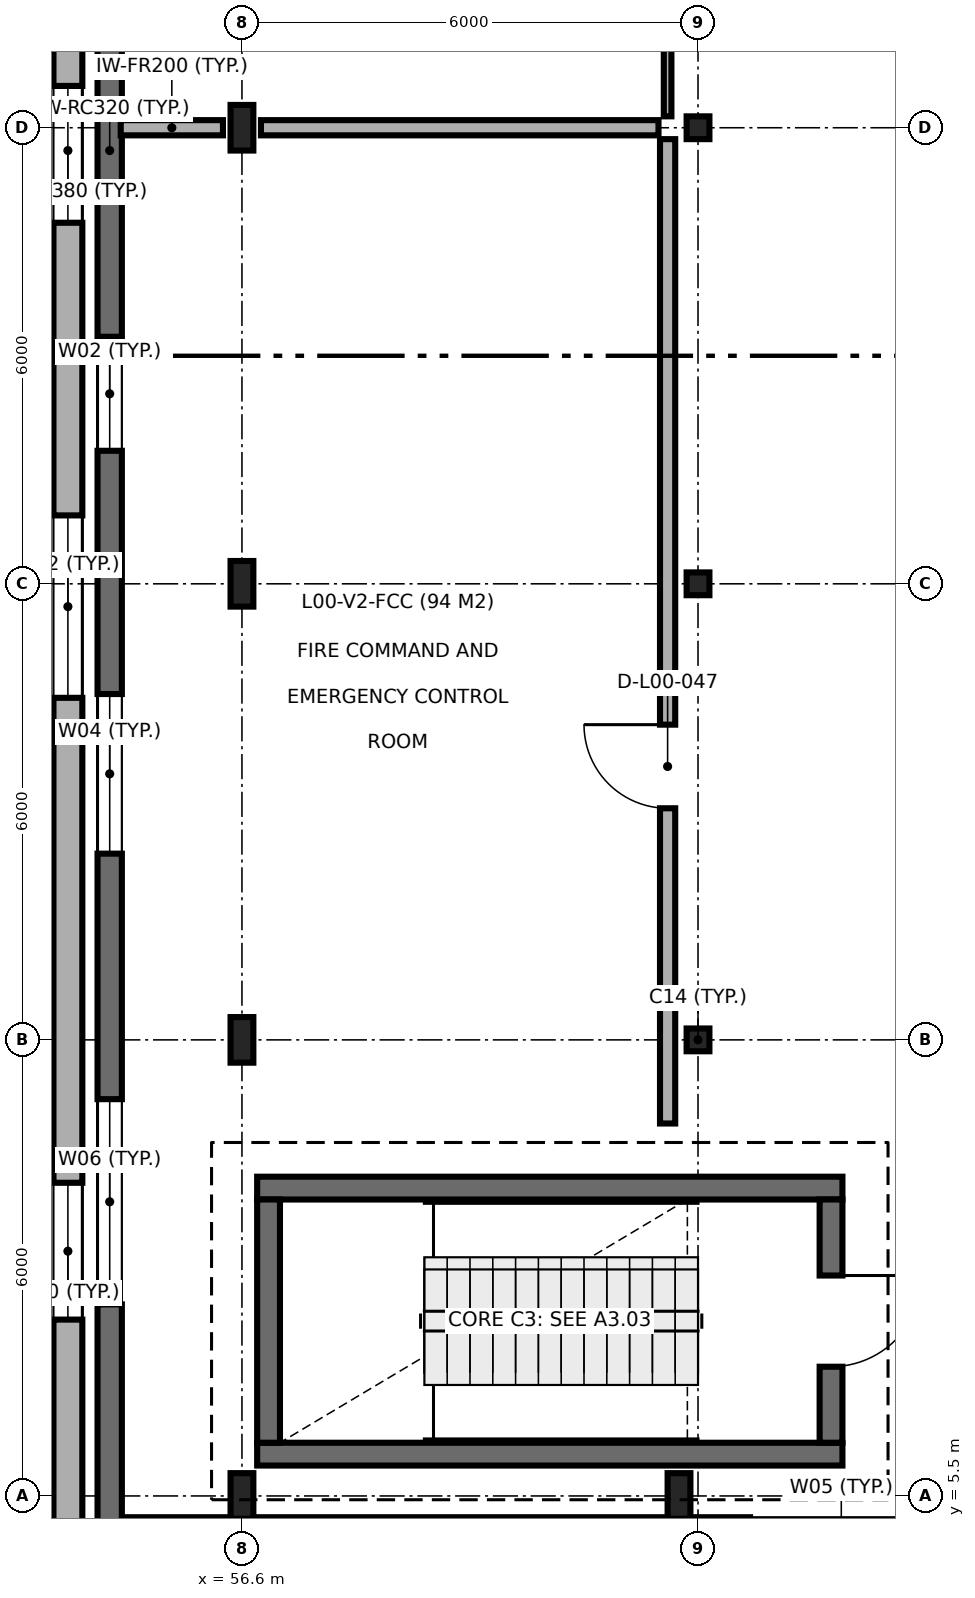
"""IFC4 building model, lengths in metres.
Left out: names, types, materials, properties, quantities, classifications, styles, units other than length and angle.
Written with IfcOpenShell. Run it as: python <this file> out.ifc"""

import sys

from ifc_helpers import new_model, si_unit, direction, frame, frame_2d, origin, origin_2d, place, context, subcontext, project, spatial, rectangle, hollow_rectangle, i_section, extrude, element, fill, save


model = new_model("IFC4")
c1 = context("Model", 3, precision=1e-05, world=origin(), true_north=direction((0.0, 1.0)))
c2 = subcontext(c1, "Body", "Model", "MODEL_VIEW")
j1 = project(units=[si_unit("LENGTHUNIT", "METRE"), si_unit("PLANEANGLEUNIT", "RADIAN")], contexts=[c1])
p1 = place(None, origin())
s1 = spatial("IfcSite", under=j1, at=p1, CompositionType="ELEMENT")
p2 = place(p1, origin())
s2 = spatial("IfcBuilding", under=s1, at=p2, CompositionType="ELEMENT")
p3 = place(p2, origin())
s3 = spatial("IfcBuildingStorey", under=s2, at=p3, CompositionType="ELEMENT", Elevation=0.0)
for number, where, z_axis, x_axis in (
    (1, (56.6, 5.5, 0.0), (0.0, 0.0, 1.0), (1.0, 0.0, 0.0)),
    (2, (56.6, 11.5, 0.0), (0.0, 0.0, 1.0), (1.0, 0.0, 0.0)),
    (3, (56.6, 17.5, 0.0), (0.0, 0.0, 1.0), (1.0, 0.0, 0.0)),
    (4, (56.6, 23.5, 0.0), (0.0, 0.0, 1.0), (1.0, 0.0, 0.0)),
    (5, (62.35, 5.5, 0.0), (0.0, 0.0, 1.0), (1.0, 0.0, 0.0)),
):
    element("IfcColumn", number, at=place(p3, frame(where, z_axis=z_axis, x_axis=x_axis)), inside=s3, PredefinedType="COLUMN", context=c2, shape_type="SweptSolid", body=[
        extrude(i_section(OverallWidth=0.3, OverallDepth=0.6, WebThickness=0.015, FlangeThickness=0.03, FilletRadius=0.027, at=origin_2d()), origin(), (0.0, 0.0, 1.0), 4.8),
    ])
for number, where, z_axis, x_axis in (
    (6, (62.6, 11.5, 0.0), (0.0, 0.0, 1.0), (1.0, 0.0, 0.0)),
    (7, (62.6, 17.5, 0.0), (0.0, 0.0, 1.0), (1.0, 0.0, 0.0)),
    (8, (62.6, 23.5, 0.0), (0.0, 0.0, 1.0), (1.0, 0.0, 0.0)),
):
    element("IfcColumn", number, at=place(p3, frame(where, z_axis=z_axis, x_axis=x_axis)), inside=s3, PredefinedType="COLUMN", context=c2, shape_type="SweptSolid", body=[
        extrude(hollow_rectangle(XDim=0.3, YDim=0.3, WallThickness=0.012, InnerFilletRadius=0.019, OuterFilletRadius=0.031, at=origin_2d()), origin(), (0.0, 0.0, 1.0), 4.8),
    ])
for number, where, z_axis, x_axis in (
    (9, (56.8, 6.05, 0.0), (0.0, 0.0, 1.0), (1.0, 0.0, 0.0)),
    (10, (64.5, 9.55, 0.0), (0.0, 0.0, 1.0), (-1.0, 0.0, 0.0)),
):
    element("IfcWall", number, at=place(p3, frame(where, z_axis=z_axis, x_axis=x_axis)), inside=s3, PredefinedType="SHEAR", context=c2, shape_type="SweptSolid", body=[
        extrude(rectangle(XDim=7.7, YDim=0.3, at=frame_2d((3.85, 0.0))), origin(), (0.0, 0.0, 1.0), 4.8),
    ])
p4 = place(p3, frame((56.95, 9.4, 0.0), z_axis=(0.0, 0.0, 1.0), x_axis=(0.0, -1.0, 0.0)))
e11 = element("IfcWall", 11, at=p4, inside=s3, PredefinedType="SHEAR", context=c2, shape_type="SweptSolid", body=[
    extrude(rectangle(XDim=3.2, YDim=0.3, at=frame_2d((1.6, 0.0))), origin(), (0.0, 0.0, 1.0), 4.8),
])
p5 = place(p3, frame((64.35, 6.2, 0.0), z_axis=(0.0, 0.0, 1.0), x_axis=(0.0, 1.0, 0.0)))
e12 = element("IfcWall", 12, at=p5, inside=s3, PredefinedType="SHEAR", context=c2, shape_type="SweptSolid", body=[
    extrude(rectangle(XDim=3.2, YDim=0.3, at=frame_2d((1.6, 0.0))), origin(), (0.0, 0.0, 1.0), 4.8),
])
p6 = place(p5, frame((1.0, 0.0, 0.0)))
e13 = element("IfcOpeningElement", 13, at=p6, cuts=e12, PredefinedType="OPENING", context=c2, shape_type="SweptSolid", body=[
    extrude(rectangle(XDim=1.2, YDim=2.15, at=frame_2d((0.6, 1.075))), frame((0.0, 0.16, 0.0), z_axis=(0.0, -1.0, 0.0), x_axis=(1.0, 0.0, 0.0)), (0.0, 0.0, 1.0), 0.32),
])
p7 = place(p3, frame((55.002, 5.06, 0.0), z_axis=(0.0, 0.0, 1.0), x_axis=(1.0, 0.0, 0.0)))
e14 = element("IfcWall", 14, at=p7, inside=s3, PredefinedType="SHEAR", context=c2, shape_type="SweptSolid", body=[
    extrude(rectangle(XDim=49.196, YDim=0.32, at=frame_2d((24.598, 0.0))), origin(), (0.0, 0.0, 1.0), 4.55),
])
p8 = place(p7, frame((19.998, 0.0, 0.0)))
e15 = element("IfcOpeningElement", 15, at=p8, cuts=e14, PredefinedType="OPENING", context=c2, shape_type="SweptSolid", body=[
    extrude(rectangle(XDim=2.0, YDim=2.4, at=frame_2d((1.0, 1.2))), frame((0.0, 0.17, 0.0), z_axis=(0.0, -1.0, 0.0), x_axis=(1.0, 0.0, 0.0)), (0.0, 0.0, 1.0), 0.34),
])
p9 = place(p7, frame((8.283, 0.0, 0.9)))
e16 = element("IfcOpeningElement", 16, at=p9, cuts=e14, PredefinedType="OPENING", context=c2, shape_type="SweptSolid", body=[
    extrude(rectangle(XDim=2.4, YDim=1.8, at=frame_2d((1.2, 0.9))), frame((0.0, 0.17, 0.0), z_axis=(0.0, -1.0, 0.0), x_axis=(1.0, 0.0, 0.0)), (0.0, 0.0, 1.0), 0.34),
])
p10 = place(p7, frame((13.898, 0.0, 0.9)))
e17 = element("IfcOpeningElement", 17, at=p10, cuts=e14, PredefinedType="OPENING", context=c2, shape_type="SweptSolid", body=[
    extrude(rectangle(XDim=0.9, YDim=1.8, at=frame_2d((0.45, 0.9))), frame((0.0, 0.17, 0.0), z_axis=(0.0, -1.0, 0.0), x_axis=(1.0, 0.0, 0.0)), (0.0, 0.0, 1.0), 0.34),
])
p11 = place(p7, frame((25.348, 0.0, 0.9)))
e18 = element("IfcOpeningElement", 18, at=p11, cuts=e14, PredefinedType="OPENING", context=c2, shape_type="SweptSolid", body=[
    extrude(rectangle(XDim=1.5, YDim=2.1, at=frame_2d((0.75, 1.05))), frame((0.0, 0.17, 0.0), z_axis=(0.0, -1.0, 0.0), x_axis=(1.0, 0.0, 0.0)), (0.0, 0.0, 1.0), 0.34),
])
p12 = place(p7, frame((28.373, 0.0, 0.9)))
e19 = element("IfcOpeningElement", 19, at=p12, cuts=e14, PredefinedType="OPENING", context=c2, shape_type="SweptSolid", body=[
    extrude(rectangle(XDim=1.2, YDim=1.8, at=frame_2d((0.6, 0.9))), frame((0.0, 0.17, 0.0), z_axis=(0.0, -1.0, 0.0), x_axis=(1.0, 0.0, 0.0)), (0.0, 0.0, 1.0), 0.34),
])
p13 = place(p7, frame((32.518, 0.0, 0.9)))
e20 = element("IfcOpeningElement", 20, at=p13, cuts=e14, PredefinedType="OPENING", context=c2, shape_type="SweptSolid", body=[
    extrude(rectangle(XDim=1.8, YDim=2.1, at=frame_2d((0.9, 1.05))), frame((0.0, 0.17, 0.0), z_axis=(0.0, -1.0, 0.0), x_axis=(1.0, 0.0, 0.0)), (0.0, 0.0, 1.0), 0.34),
])
p14 = place(p7, frame((37.248, 0.0, 0.9)))
e21 = element("IfcOpeningElement", 21, at=p14, cuts=e14, PredefinedType="OPENING", context=c2, shape_type="SweptSolid", body=[
    extrude(rectangle(XDim=1.2, YDim=1.5, at=frame_2d((0.6, 0.75))), frame((0.0, 0.17, 0.0), z_axis=(0.0, -1.0, 0.0), x_axis=(1.0, 0.0, 0.0)), (0.0, 0.0, 1.0), 0.34),
])
p15 = place(p7, frame((40.268, 0.0, 0.9)))
e22 = element("IfcOpeningElement", 22, at=p15, cuts=e14, PredefinedType="OPENING", context=c2, shape_type="SweptSolid", body=[
    extrude(rectangle(XDim=0.9, YDim=1.8, at=frame_2d((0.45, 0.9))), frame((0.0, 0.17, 0.0), z_axis=(0.0, -1.0, 0.0), x_axis=(1.0, 0.0, 0.0)), (0.0, 0.0, 1.0), 0.34),
])
p16 = place(p7, frame((44.123, 0.0, 0.9)))
e23 = element("IfcOpeningElement", 23, at=p16, cuts=e14, PredefinedType="OPENING", context=c2, shape_type="SweptSolid", body=[
    extrude(rectangle(XDim=1.2, YDim=2.4, at=frame_2d((0.6, 1.2))), frame((0.0, 0.17, 0.0), z_axis=(0.0, -1.0, 0.0), x_axis=(1.0, 0.0, 0.0)), (0.0, 0.0, 1.0), 0.34),
])
p17 = place(p3, frame((54.86, 41.5, 0.0), z_axis=(0.0, 0.0, 1.0), x_axis=(0.0, -1.0, 0.0)))
e24 = element("IfcWall", 24, at=p17, inside=s3, PredefinedType="SHEAR", context=c2, shape_type="SweptSolid", body=[
    extrude(rectangle(XDim=36.6, YDim=0.32, at=frame_2d((18.3, 0.0))), origin(), (0.0, 0.0, 1.0), 4.55),
])
p18 = place(p17, frame((1.39, 0.0, 0.9)))
e25 = element("IfcOpeningElement", 25, at=p18, cuts=e24, PredefinedType="OPENING", context=c2, shape_type="SweptSolid", body=[
    extrude(rectangle(XDim=2.55, YDim=1.95, at=frame_2d((1.275, 0.975))), frame((0.0, 0.17, 0.0), z_axis=(0.0, -1.0, 0.0), x_axis=(1.0, 0.0, 0.0)), (0.0, 0.0, 1.0), 0.34),
])
p19 = place(p17, frame((6.135, 0.0, 0.9)))
e26 = element("IfcOpeningElement", 26, at=p19, cuts=e24, PredefinedType="OPENING", context=c2, shape_type="SweptSolid", body=[
    extrude(rectangle(XDim=1.4, YDim=1.65, at=frame_2d((0.7, 0.825))), frame((0.0, 0.17, 0.0), z_axis=(0.0, -1.0, 0.0), x_axis=(1.0, 0.0, 0.0)), (0.0, 0.0, 1.0), 0.34),
])
p20 = place(p17, frame((10.405, 0.0, 0.9)))
e27 = element("IfcOpeningElement", 27, at=p20, cuts=e24, PredefinedType="OPENING", context=c2, shape_type="SweptSolid", body=[
    extrude(rectangle(XDim=1.2, YDim=1.8, at=frame_2d((0.6, 0.9))), frame((0.0, 0.17, 0.0), z_axis=(0.0, -1.0, 0.0), x_axis=(1.0, 0.0, 0.0)), (0.0, 0.0, 1.0), 0.34),
])
p21 = place(p17, frame((14.275, 0.0, 0.9)))
e28 = element("IfcOpeningElement", 28, at=p21, cuts=e24, PredefinedType="OPENING", context=c2, shape_type="SweptSolid", body=[
    extrude(rectangle(XDim=1.8, YDim=1.8, at=frame_2d((0.9, 0.9))), frame((0.0, 0.17, 0.0), z_axis=(0.0, -1.0, 0.0), x_axis=(1.0, 0.0, 0.0)), (0.0, 0.0, 1.0), 0.34),
])
p22 = place(p17, frame((20.75, 0.0, 0.9)))
e29 = element("IfcOpeningElement", 29, at=p22, cuts=e24, PredefinedType="OPENING", context=c2, shape_type="SweptSolid", body=[
    extrude(rectangle(XDim=1.5, YDim=1.8, at=frame_2d((0.75, 0.9))), frame((0.0, 0.17, 0.0), z_axis=(0.0, -1.0, 0.0), x_axis=(1.0, 0.0, 0.0)), (0.0, 0.0, 1.0), 0.34),
])
p23 = place(p17, frame((25.45, 0.0, 0.9)))
e30 = element("IfcOpeningElement", 30, at=p23, cuts=e24, PredefinedType="OPENING", context=c2, shape_type="SweptSolid", body=[
    extrude(rectangle(XDim=2.1, YDim=1.8, at=frame_2d((1.05, 0.9))), frame((0.0, 0.17, 0.0), z_axis=(0.0, -1.0, 0.0), x_axis=(1.0, 0.0, 0.0)), (0.0, 0.0, 1.0), 0.34),
])
p24 = place(p17, frame((30.78, 0.0, 0.9)))
e31 = element("IfcOpeningElement", 31, at=p24, cuts=e24, PredefinedType="OPENING", context=c2, shape_type="SweptSolid", body=[
    extrude(rectangle(XDim=2.7, YDim=1.8, at=frame_2d((1.35, 0.9))), frame((0.0, 0.17, 0.0), z_axis=(0.0, -1.0, 0.0), x_axis=(1.0, 0.0, 0.0)), (0.0, 0.0, 1.0), 0.34),
])
p25 = place(p3, frame((5.962, 5.09, 0.0), z_axis=(0.0, 0.0, 1.0), x_axis=(1.0, 0.0, 0.0)))
e32 = element("IfcWall", 32, at=p25, inside=s3, PredefinedType="SOLIDWALL", context=c2, shape_type="SweptSolid", body=[
    extrude(rectangle(XDim=48.176, YDim=0.38, at=frame_2d((24.088, 0.0))), origin(), (0.0, 0.0, 1.0), 4.55),
])
p26 = place(p25, frame((10.614, 0.0, 0.9)))
e33 = element("IfcOpeningElement", 33, at=p26, cuts=e32, PredefinedType="OPENING", context=c2, shape_type="SweptSolid", body=[
    extrude(rectangle(XDim=1.2, YDim=1.8, at=frame_2d((0.6, 0.9))), frame((0.0, 0.2, 0.0), z_axis=(0.0, -1.0, 0.0), x_axis=(1.0, 0.0, 0.0)), (0.0, 0.0, 1.0), 0.4),
])
p27 = place(p25, frame((13.458, 0.0, 0.9)))
e34 = element("IfcOpeningElement", 34, at=p27, cuts=e32, PredefinedType="OPENING", context=c2, shape_type="SweptSolid", body=[
    extrude(rectangle(XDim=1.2, YDim=1.8, at=frame_2d((0.6, 0.9))), frame((0.0, 0.2, 0.0), z_axis=(0.0, -1.0, 0.0), x_axis=(1.0, 0.0, 0.0)), (0.0, 0.0, 1.0), 0.4),
])
p28 = place(p25, frame((29.438, 0.0, 0.9)))
e35 = element("IfcOpeningElement", 35, at=p28, cuts=e32, PredefinedType="OPENING", context=c2, shape_type="SweptSolid", body=[
    extrude(rectangle(XDim=2.4, YDim=1.8, at=frame_2d((1.2, 0.9))), frame((0.0, 0.2, 0.0), z_axis=(0.0, -1.0, 0.0), x_axis=(1.0, 0.0, 0.0)), (0.0, 0.0, 1.0), 0.4),
])
p29 = place(p25, frame((33.738, 0.0, 0.9)))
e36 = element("IfcOpeningElement", 36, at=p29, cuts=e32, PredefinedType="OPENING", context=c2, shape_type="SweptSolid", body=[
    extrude(rectangle(XDim=1.8, YDim=2.1, at=frame_2d((0.9, 1.05))), frame((0.0, 0.2, 0.0), z_axis=(0.0, -1.0, 0.0), x_axis=(1.0, 0.0, 0.0)), (0.0, 0.0, 1.0), 0.4),
])
p30 = place(p25, frame((37.258, 0.0, 0.9)))
e37 = element("IfcOpeningElement", 37, at=p30, cuts=e32, PredefinedType="OPENING", context=c2, shape_type="SweptSolid", body=[
    extrude(rectangle(XDim=0.9, YDim=1.8, at=frame_2d((0.45, 0.9))), frame((0.0, 0.2, 0.0), z_axis=(0.0, -1.0, 0.0), x_axis=(1.0, 0.0, 0.0)), (0.0, 0.0, 1.0), 0.4),
])
p31 = place(p25, frame((39.018, 0.0, 0.9)))
e38 = element("IfcOpeningElement", 38, at=p31, cuts=e32, PredefinedType="OPENING", context=c2, shape_type="SweptSolid", body=[
    extrude(rectangle(XDim=0.9, YDim=1.8, at=frame_2d((0.45, 0.9))), frame((0.0, 0.2, 0.0), z_axis=(0.0, -1.0, 0.0), x_axis=(1.0, 0.0, 0.0)), (0.0, 0.0, 1.0), 0.4),
])
p32 = place(p25, frame((41.538, 0.0, 0.9)))
e39 = element("IfcOpeningElement", 39, at=p32, cuts=e32, PredefinedType="OPENING", context=c2, shape_type="SweptSolid", body=[
    extrude(rectangle(XDim=1.2, YDim=1.8, at=frame_2d((0.6, 0.9))), frame((0.0, 0.2, 0.0), z_axis=(0.0, -1.0, 0.0), x_axis=(1.0, 0.0, 0.0)), (0.0, 0.0, 1.0), 0.4),
])
p33 = place(p25, frame((44.538, 0.0, 0.9)))
e40 = element("IfcOpeningElement", 40, at=p33, cuts=e32, PredefinedType="OPENING", context=c2, shape_type="SweptSolid", body=[
    extrude(rectangle(XDim=1.2, YDim=1.5, at=frame_2d((0.6, 0.75))), frame((0.0, 0.2, 0.0), z_axis=(0.0, -1.0, 0.0), x_axis=(1.0, 0.0, 0.0)), (0.0, 0.0, 1.0), 0.4),
])
p34 = place(p3, frame((54.31, 4.9, 0.0), z_axis=(0.0, 0.0, 1.0), x_axis=(0.0, 1.0, 0.0)))
e41 = element("IfcWall", 41, at=p34, inside=s3, PredefinedType="SOLIDWALL", context=c2, shape_type="SweptSolid", body=[
    extrude(rectangle(XDim=36.6, YDim=0.38, at=frame_2d((18.3, 0.0))), origin(), (0.0, 0.0, 1.0), 4.55),
])
p35 = place(p34, frame((2.92, 0.0, 0.9)))
e42 = element("IfcOpeningElement", 42, at=p35, cuts=e41, PredefinedType="OPENING", context=c2, shape_type="SweptSolid", body=[
    extrude(rectangle(XDim=1.8, YDim=2.1, at=frame_2d((0.9, 1.05))), frame((0.0, 0.2, 0.0), z_axis=(0.0, -1.0, 0.0), x_axis=(1.0, 0.0, 0.0)), (0.0, 0.0, 1.0), 0.4),
])
p36 = place(p34, frame((11.1, 0.0, 0.9)))
e43 = element("IfcOpeningElement", 43, at=p36, cuts=e41, PredefinedType="OPENING", context=c2, shape_type="SweptSolid", body=[
    extrude(rectangle(XDim=2.4, YDim=2.1, at=frame_2d((1.2, 1.05))), frame((0.0, 0.2, 0.0), z_axis=(0.0, -1.0, 0.0), x_axis=(1.0, 0.0, 0.0)), (0.0, 0.0, 1.0), 0.4),
])
p37 = place(p34, frame((17.35, 0.0, 0.9)))
e44 = element("IfcOpeningElement", 44, at=p37, cuts=e41, PredefinedType="OPENING", context=c2, shape_type="SweptSolid", body=[
    extrude(rectangle(XDim=1.8, YDim=2.1, at=frame_2d((0.9, 1.05))), frame((0.0, 0.2, 0.0), z_axis=(0.0, -1.0, 0.0), x_axis=(1.0, 0.0, 0.0)), (0.0, 0.0, 1.0), 0.4),
])
p38 = place(p34, frame((21.35, 0.0, 0.9)))
e45 = element("IfcOpeningElement", 45, at=p38, cuts=e41, PredefinedType="OPENING", context=c2, shape_type="SweptSolid", body=[
    extrude(rectangle(XDim=1.5, YDim=1.5, at=frame_2d((0.75, 0.75))), frame((0.0, 0.2, 0.0), z_axis=(0.0, -1.0, 0.0), x_axis=(1.0, 0.0, 0.0)), (0.0, 0.0, 1.0), 0.4),
])
p39 = place(p34, frame((26.21, 0.0, 0.9)))
e46 = element("IfcOpeningElement", 46, at=p39, cuts=e41, PredefinedType="OPENING", context=c2, shape_type="SweptSolid", body=[
    extrude(rectangle(XDim=2.4, YDim=1.5, at=frame_2d((1.2, 0.75))), frame((0.0, 0.2, 0.0), z_axis=(0.0, -1.0, 0.0), x_axis=(1.0, 0.0, 0.0)), (0.0, 0.0, 1.0), 0.4),
])
p40 = place(p34, frame((32.35, 0.0, 0.9)))
e47 = element("IfcOpeningElement", 47, at=p40, cuts=e41, PredefinedType="OPENING", context=c2, shape_type="SweptSolid", body=[
    extrude(rectangle(XDim=1.6, YDim=2.4, at=frame_2d((0.8, 1.2))), frame((0.0, 0.2, 0.0), z_axis=(0.0, -1.0, 0.0), x_axis=(1.0, 0.0, 0.0)), (0.0, 0.0, 1.0), 0.4),
])
p41 = place(p3, frame((55.005, 23.5, 0.0), z_axis=(0.0, 0.0, 1.0), x_axis=(1.0, 0.0, 0.0)))
e48 = element("IfcWall", 48, at=p41, inside=s3, PredefinedType="SOLIDWALL", context=c2, shape_type="SweptSolid", body=[
    extrude(rectangle(XDim=1.345, YDim=0.2, at=frame_2d((0.673, 0.0))), origin(), (0.0, 0.0, 1.0), 4.19),
])
p42 = place(p3, frame((56.85, 23.5, 0.0), z_axis=(0.0, 0.0, 1.0), x_axis=(1.0, 0.0, 0.0)))
e49 = element("IfcWall", 49, at=p42, inside=s3, PredefinedType="SOLIDWALL", context=c2, shape_type="SweptSolid", body=[
    extrude(rectangle(XDim=5.23, YDim=0.2, at=frame_2d((2.615, 0.0))), origin(), (0.0, 0.0, 1.0), 4.19),
])
p43 = place(p3, frame((62.2, 10.4, 0.0), z_axis=(0.0, 0.0, 1.0), x_axis=(0.0, 1.0, 0.0)))
e50 = element("IfcWall", 50, at=p43, inside=s3, PredefinedType="SOLIDWALL", context=c2, shape_type="SweptSolid", body=[
    extrude(rectangle(XDim=12.95, YDim=0.2, at=frame_2d((6.475, 0.0))), origin(), (0.0, 0.0, 1.0), 4.55),
])
p44 = place(p43, frame((4.147, 0.0, 0.0)))
e51 = element("IfcOpeningElement", 51, at=p44, cuts=e50, PredefinedType="OPENING", context=c2, shape_type="SweptSolid", body=[
    extrude(rectangle(XDim=1.1, YDim=2.15, at=frame_2d((0.55, 1.075))), frame((0.0, 0.11, 0.0), z_axis=(0.0, -1.0, 0.0), x_axis=(1.0, 0.0, 0.0)), (0.0, 0.0, 1.0), 0.22),
])
p45 = place(p3, frame((62.2, 23.65, 0.0), z_axis=(0.0, 0.0, 1.0), x_axis=(0.0, 1.0, 0.0)))
e52 = element("IfcWall", 52, at=p45, inside=s3, PredefinedType="PARTITIONING", context=c2, shape_type="SweptSolid", body=[
    extrude(rectangle(XDim=17.545, YDim=0.1, at=frame_2d((8.772, 0.0))), origin(), (0.0, 0.0, 1.0), 4.55),
])
p46 = place(p45, frame((8.223, 0.0, 0.0)))
e53 = element("IfcOpeningElement", 53, at=p46, cuts=e52, PredefinedType="OPENING", context=c2, shape_type="SweptSolid", body=[
    extrude(rectangle(XDim=1.1, YDim=2.15, at=frame_2d((0.55, 1.075))), frame((0.0, 0.06, 0.0), z_axis=(0.0, -1.0, 0.0), x_axis=(1.0, 0.0, 0.0)), (0.0, 0.0, 1.0), 0.12),
])
p47 = place(p6, frame((1.2, 0.0, 0.0), z_axis=(0.0, 0.0, 1.0), x_axis=(-1.0, 0.0, 0.0)))
e54 = element("IfcDoor", 54, at=p47, inside=s3, OperationType="SINGLE_SWING_RIGHT", PredefinedType="DOOR", context=c2, shape_type="SweptSolid", body=[
    extrude(rectangle(XDim=1.2, YDim=2.15, at=frame_2d((0.6, 1.075))), frame((0.0, 0.025, 0.0), z_axis=(0.0, -1.0, 0.0), x_axis=(1.0, 0.0, 0.0)), (0.0, 0.0, 1.0), 0.05),
])
fill(e13, e54)
p48 = place(p22, origin())
e55 = element("IfcWindow", 55, at=p48, inside=s3, PartitioningType="SINGLE_PANEL", PredefinedType="WINDOW", context=c2, shape_type="SweptSolid", body=[
    extrude(rectangle(XDim=1.5, YDim=1.8, at=frame_2d((0.75, 0.9))), frame((0.0, 0.03, 0.0), z_axis=(0.0, -1.0, 0.0), x_axis=(1.0, 0.0, 0.0)), (0.0, 0.0, 1.0), 0.06),
])
fill(e29, e55)
p49 = place(p23, origin())
e56 = element("IfcWindow", 56, at=p49, inside=s3, PartitioningType="SINGLE_PANEL", PredefinedType="WINDOW", context=c2, shape_type="SweptSolid", body=[
    extrude(rectangle(XDim=2.1, YDim=1.8, at=frame_2d((1.05, 0.9))), frame((0.0, 0.03, 0.0), z_axis=(0.0, -1.0, 0.0), x_axis=(1.0, 0.0, 0.0)), (0.0, 0.0, 1.0), 0.06),
])
fill(e30, e56)
p50 = place(p24, origin())
e57 = element("IfcWindow", 57, at=p50, inside=s3, PartitioningType="SINGLE_PANEL", PredefinedType="WINDOW", context=c2, shape_type="SweptSolid", body=[
    extrude(rectangle(XDim=2.7, YDim=1.8, at=frame_2d((1.35, 0.9))), frame((0.0, 0.03, 0.0), z_axis=(0.0, -1.0, 0.0), x_axis=(1.0, 0.0, 0.0)), (0.0, 0.0, 1.0), 0.06),
])
fill(e31, e57)
p51 = place(p35, origin())
e58 = element("IfcWindow", 58, at=p51, inside=s3, PartitioningType="SINGLE_PANEL", PredefinedType="WINDOW", context=c2, shape_type="SweptSolid", body=[
    extrude(rectangle(XDim=1.8, YDim=2.1, at=frame_2d((0.9, 1.05))), frame((0.0, 0.03, 0.0), z_axis=(0.0, -1.0, 0.0), x_axis=(1.0, 0.0, 0.0)), (0.0, 0.0, 1.0), 0.06),
])
fill(e42, e58)
p52 = place(p36, origin())
e59 = element("IfcWindow", 59, at=p52, inside=s3, PartitioningType="SINGLE_PANEL", PredefinedType="WINDOW", context=c2, shape_type="SweptSolid", body=[
    extrude(rectangle(XDim=2.4, YDim=2.1, at=frame_2d((1.2, 1.05))), frame((0.0, 0.03, 0.0), z_axis=(0.0, -1.0, 0.0), x_axis=(1.0, 0.0, 0.0)), (0.0, 0.0, 1.0), 0.06),
])
fill(e43, e59)
p53 = place(p37, origin())
e60 = element("IfcWindow", 60, at=p53, inside=s3, PartitioningType="SINGLE_PANEL", PredefinedType="WINDOW", context=c2, shape_type="SweptSolid", body=[
    extrude(rectangle(XDim=1.8, YDim=2.1, at=frame_2d((0.9, 1.05))), frame((0.0, 0.03, 0.0), z_axis=(0.0, -1.0, 0.0), x_axis=(1.0, 0.0, 0.0)), (0.0, 0.0, 1.0), 0.06),
])
fill(e44, e60)
p54 = place(p44, origin())
e61 = element("IfcDoor", 61, at=p54, inside=s3, OperationType="SINGLE_SWING_RIGHT", PredefinedType="DOOR", context=c2, shape_type="SweptSolid", body=[
    extrude(rectangle(XDim=1.1, YDim=2.15, at=frame_2d((0.55, 1.075))), frame((0.0, 0.025, 0.0), z_axis=(0.0, -1.0, 0.0), x_axis=(1.0, 0.0, 0.0)), (0.0, 0.0, 1.0), 0.05),
])
fill(e51, e61)
save(model, sys.argv[1])
